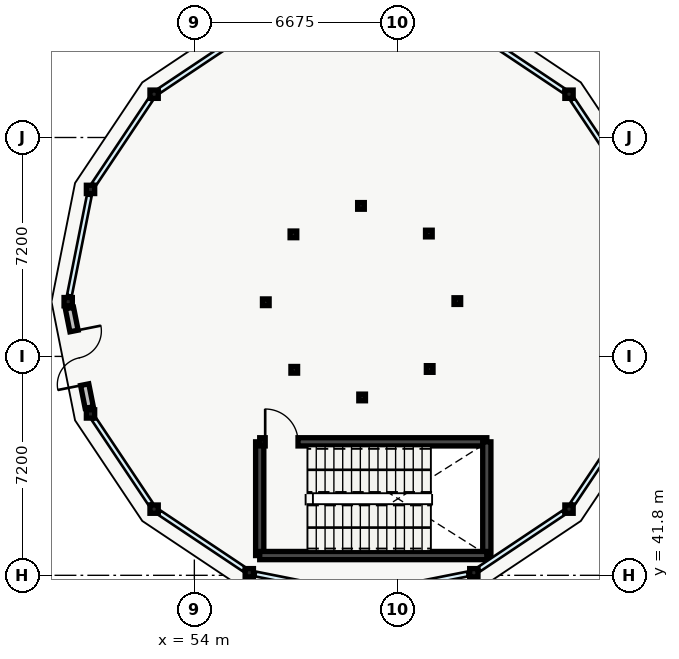
"""IFC4 building model, lengths in metres.
Left out: names, types, materials, properties, quantities, classifications, styles, units other than length and angle.
Written with IfcOpenShell. Run it as: python <this file> out.ifc"""

import sys

from ifc_helpers import new_model, si_unit, direction, frame, frame_2d, origin, origin_2d, place, context, subcontext, project, spatial, rectangle, hollow_circle, extrude, element, fill, save


model = new_model("IFC4")
c1 = context("Model", 3, precision=1e-05, world=origin(), true_north=direction((0.0, 1.0)))
c2 = subcontext(c1, "Body", "Model", "MODEL_VIEW")
j1 = project(units=[si_unit("LENGTHUNIT", "METRE"), si_unit("PLANEANGLEUNIT", "RADIAN")], contexts=[c1])
p1 = place(None, origin())
s1 = spatial("IfcSite", under=j1, at=p1, CompositionType="ELEMENT")
p2 = place(p1, origin())
s2 = spatial("IfcBuilding", under=s1, at=p2, CompositionType="ELEMENT")
p3 = place(p2, origin())
s3 = spatial("IfcBuildingStorey", under=s2, at=p3, CompositionType="ELEMENT", Elevation=0.0)
for number, where, z_axis, x_axis in (
    (1, (66.323, 57.624, 0.0), (0.0, 0.0, 1.0), (1.0, 0.0, 0.0)),
    (2, (52.677, 57.624, 0.0), (0.0, 0.0, 1.0), (1.0, 0.0, 0.0)),
    (3, (50.584, 54.493, 0.0), (0.0, 0.0, 1.0), (1.0, 0.0, 0.0)),
    (4, (49.85, 50.8, 0.0), (0.0, 0.0, 1.0), (1.0, 0.0, 0.0)),
    (5, (50.584, 47.107, 0.0), (0.0, 0.0, 1.0), (1.0, 0.0, 0.0)),
    (6, (52.677, 43.976, 0.0), (0.0, 0.0, 1.0), (1.0, 0.0, 0.0)),
    (7, (55.807, 41.885, 0.0), (0.0, 0.0, 1.0), (1.0, 0.0, 0.0)),
    (8, (63.193, 41.885, 0.0), (0.0, 0.0, 1.0), (1.0, 0.0, 0.0)),
    (9, (66.323, 43.976, 0.0), (0.0, 0.0, 1.0), (1.0, 0.0, 0.0)),
):
    element("IfcColumn", number, at=place(p3, frame(where, z_axis=z_axis, x_axis=x_axis)), inside=s3, PredefinedType="COLUMN", context=c2, shape_type="SweptSolid", body=[
        extrude(hollow_circle(Radius=0.136, WallThickness=0.01, at=origin_2d()), origin(), (0.0, 0.0, 1.0), 4.92),
    ])
for number, where, z_axis, x_axis in (
    (10, (62.65, 50.819, 0.0), (0.0, 0.0, 1.0), (1.0, 0.0, 0.0)),
    (11, (61.714, 53.041, 0.0), (0.0, 0.0, 1.0), (1.0, 0.0, 0.0)),
    (12, (59.481, 53.95, 0.0), (0.0, 0.0, 1.0), (1.0, 0.0, 0.0)),
    (13, (57.259, 53.014, 0.0), (0.0, 0.0, 1.0), (1.0, 0.0, 0.0)),
    (14, (56.35, 50.781, 0.0), (0.0, 0.0, 1.0), (1.0, 0.0, 0.0)),
    (15, (57.286, 48.559, 0.0), (0.0, 0.0, 1.0), (1.0, 0.0, 0.0)),
    (16, (59.519, 47.65, 0.0), (0.0, 0.0, 1.0), (1.0, 0.0, 0.0)),
    (17, (61.741, 48.586, 0.0), (0.0, 0.0, 1.0), (1.0, 0.0, 0.0)),
):
    element("IfcColumn", number, at=place(p3, frame(where, z_axis=z_axis, x_axis=x_axis)), inside=s3, PredefinedType="COLUMN", context=c2, shape_type="SweptSolid", body=[
        extrude(hollow_circle(Radius=0.11, WallThickness=0.01, at=origin_2d()), origin(), (0.0, 0.0, 1.0), 4.92),
    ])
p4 = place(p3, frame((50.543, 47.318, 0.0), z_axis=(0.0, 0.0, 1.0), x_axis=(-0.195144763277, 0.980774449792, 0.0)))
e18 = element("IfcWall", 18, at=p4, inside=s3, PredefinedType="STANDARD", context=c2, shape_type="SweptSolid", body=[
    extrude(rectangle(XDim=3.335, YDim=0.275, at=frame_2d((1.668, 0.0))), origin(), (0.0, 0.0, 1.0), 4.45),
])
p5 = place(p4, frame((0.768, 0.0, 0.0)))
e19 = element("IfcOpeningElement", 19, at=p5, cuts=e18, PredefinedType="OPENING", context=c2, shape_type="SweptSolid", body=[
    extrude(rectangle(XDim=1.8, YDim=2.25, at=frame_2d((0.9, 1.125))), frame((0.0, 0.137, 0.0), z_axis=(0.0, -1.0, 0.0), x_axis=(1.0, 0.0, 0.0)), (0.0, 0.0, 1.0), 0.275),
])
p6 = place(p3, frame((56.15, 42.45, 0.0), z_axis=(0.0, 0.0, 1.0), x_axis=(0.0, 1.0, 0.0)))
e20 = element("IfcWall", 20, at=p6, inside=s3, PredefinedType="SHEAR", context=c2, shape_type="SweptSolid", body=[
    extrude(rectangle(XDim=3.74, YDim=0.27, at=frame_2d((1.87, 0.0))), origin(), (0.0, 0.0, 1.0), 4.88),
])
p7 = place(p3, frame((56.15, 46.19, 0.0), z_axis=(0.0, 0.0, 1.0), x_axis=(1.0, 0.0, 0.0)))
e21 = element("IfcWall", 21, at=p7, inside=s3, PredefinedType="SHEAR", context=c2, shape_type="SweptSolid", body=[
    extrude(rectangle(XDim=7.47, YDim=0.27, at=frame_2d((3.735, 0.0))), origin(), (0.0, 0.0, 1.0), 4.88),
])
p8 = place(p7, frame((0.18, 0.0, 0.0)))
e22 = element("IfcOpeningElement", 22, at=p8, cuts=e21, PredefinedType="OPENING", context=c2, shape_type="SweptSolid", body=[
    extrude(rectangle(XDim=1.08, YDim=2.15, at=frame_2d((0.54, 1.075))), frame((0.0, 0.135, 0.0), z_axis=(0.0, -1.0, 0.0), x_axis=(1.0, 0.0, 0.0)), (0.0, 0.0, 1.0), 0.27),
])
p9 = place(p3, frame((63.62, 46.19, 0.0), z_axis=(0.0, 0.0, 1.0), x_axis=(0.0, -1.0, 0.0)))
e23 = element("IfcWall", 23, at=p9, inside=s3, PredefinedType="SHEAR", context=c2, shape_type="SweptSolid", body=[
    extrude(rectangle(XDim=3.74, YDim=0.27, at=frame_2d((1.87, 0.0))), origin(), (0.0, 0.0, 1.0), 4.88),
])
p10 = place(p3, frame((63.62, 42.45, 0.0), z_axis=(0.0, 0.0, 1.0), x_axis=(-1.0, 0.0, 0.0)))
e24 = element("IfcWall", 24, at=p10, inside=s3, PredefinedType="SHEAR", context=c2, shape_type="SweptSolid", body=[
    extrude(rectangle(XDim=7.47, YDim=0.27, at=frame_2d((3.735, 0.0))), origin(), (0.0, 0.0, 1.0), 4.88),
])
p11 = place(p5, origin())
e25 = element("IfcDoor", 25, at=p11, inside=s3, OperationType="DOUBLE_DOOR_SINGLE_SWING", PredefinedType="DOOR", context=c2, shape_type="SweptSolid", body=[
    extrude(rectangle(XDim=1.8, YDim=2.25, at=frame_2d((0.9, 1.125))), frame((0.0, 0.025, 0.0), z_axis=(0.0, -1.0, 0.0), x_axis=(1.0, 0.0, 0.0)), (0.0, 0.0, 1.0), 0.05),
])
fill(e19, e25)
p12 = place(p8, origin())
e26 = element("IfcDoor", 26, at=p12, inside=s3, OperationType="SINGLE_SWING_LEFT", PredefinedType="DOOR", context=c2, shape_type="SweptSolid", body=[
    extrude(rectangle(XDim=1.08, YDim=2.15, at=frame_2d((0.54, 1.075))), frame((0.0, 0.025, 0.0), z_axis=(0.0, -1.0, 0.0), x_axis=(1.0, 0.0, 0.0)), (0.0, 0.0, 1.0), 0.05),
])
fill(e22, e26)
save(model, sys.argv[1])
